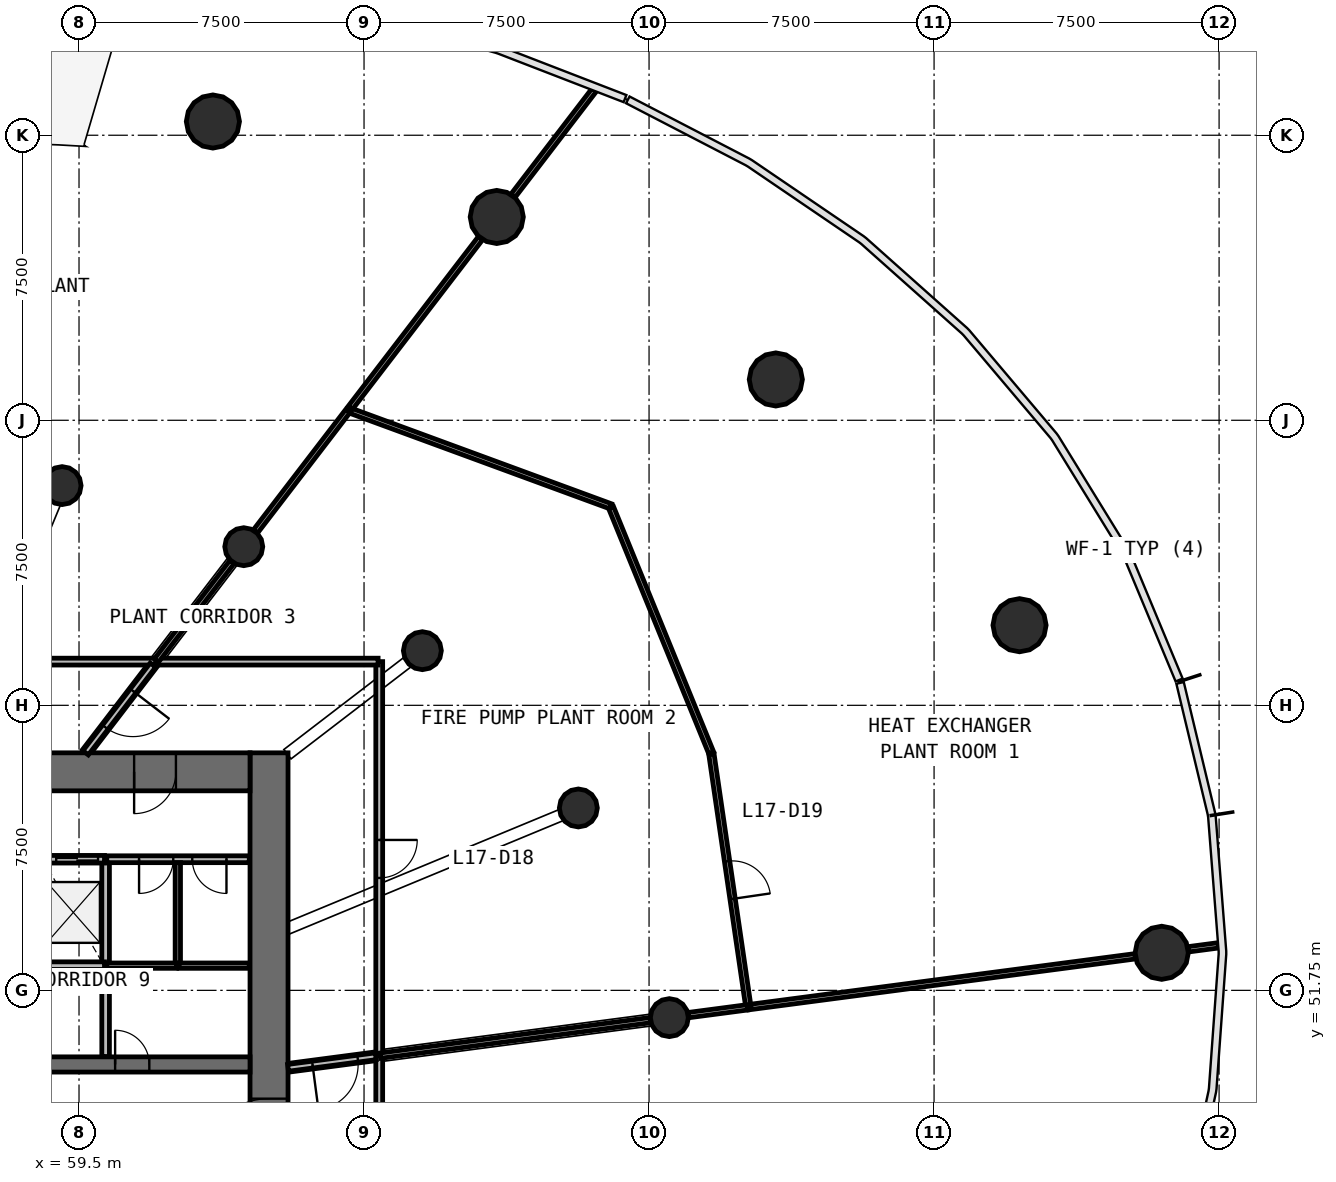
"""IFC4 building model, lengths in metres.
Left out: names, types, materials, properties, quantities, classifications, styles, units other than length and angle.
Written with IfcOpenShell. Run it as: python <this file> out.ifc"""

import sys

from ifc_helpers import new_model, si_unit, direction, frame, frame_2d, origin, origin_2d, place, context, subcontext, project, spatial, rectangle, circle, extrude, source, transform, mapped, element, fill, save


model = new_model("IFC4")
c1 = context("Model", 3, precision=1e-05, world=origin(), true_north=direction((0.0, 1.0)))
c2 = subcontext(c1, "Body", "Model", "MODEL_VIEW")
j1 = project(units=[si_unit("LENGTHUNIT", "METRE"), si_unit("PLANEANGLEUNIT", "RADIAN")], contexts=[c1])
p1 = place(None, origin())
s1 = spatial("IfcSite", under=j1, at=p1, CompositionType="ELEMENT")
p2 = place(p1, origin())
s2 = spatial("IfcBuilding", under=s1, at=p2, CompositionType="ELEMENT")
p3 = place(p2, frame((0.0, 0.0, 75.4)))
s3 = spatial("IfcBuildingStorey", under=s2, at=p3, CompositionType="ELEMENT", Elevation=75.4)
p4 = place(p3, frame((64.5, 38.0, 0.0), z_axis=(0.0, 0.0, 1.0), x_axis=(0.0, 1.0, 0.0)))
e1 = element("IfcWall", 1, at=p4, inside=s3, PredefinedType="SHEAR", context=c2, shape_type="SweptSolid", body=[
    extrude(rectangle(XDim=20.0, YDim=1.0, at=frame_2d((10.0, 0.0))), origin(), (0.0, 0.0, 1.0), 4.4),
])
p5 = place(p4, frame((9.1, 0.0, 0.0)))
e2 = element("IfcOpeningElement", 2, at=p5, cuts=e1, PredefinedType="OPENING", context=c2, shape_type="SweptSolid", body=[
    extrude(rectangle(XDim=1.8, YDim=2.1, at=frame_2d((0.9, 1.05))), frame((0.0, 0.51, 0.0), z_axis=(0.0, -1.0, 0.0), x_axis=(1.0, 0.0, 0.0)), (0.0, 0.0, 1.0), 1.02),
])
p6 = place(p3, frame((64.0, 57.5, 0.0), z_axis=(0.0, 0.0, 1.0), x_axis=(-1.0, 0.0, 0.0)))
e3 = element("IfcWall", 3, at=p6, inside=s3, PredefinedType="SHEAR", context=c2, shape_type="SweptSolid", body=[
    extrude(rectangle(XDim=24.0, YDim=1.0, at=frame_2d((12.0, 0.0))), origin(), (0.0, 0.0, 1.0), 4.4),
])
p7 = place(p6, frame((21.45, 0.0, 0.0)))
e4 = element("IfcOpeningElement", 4, at=p7, cuts=e3, PredefinedType="OPENING", context=c2, shape_type="SweptSolid", body=[
    extrude(rectangle(XDim=1.1, YDim=2.1, at=frame_2d((0.55, 1.05))), frame((0.0, 0.51, 0.0), z_axis=(0.0, -1.0, 0.0), x_axis=(1.0, 0.0, 0.0)), (0.0, 0.0, 1.0), 1.02),
])
p8 = place(p6, frame((1.95, 0.0, 0.0)))
e5 = element("IfcOpeningElement", 5, at=p8, cuts=e3, PredefinedType="OPENING", context=c2, shape_type="SweptSolid", body=[
    extrude(rectangle(XDim=1.1, YDim=2.1, at=frame_2d((0.55, 1.05))), frame((0.0, 0.51, 0.0), z_axis=(0.0, -1.0, 0.0), x_axis=(1.0, 0.0, 0.0)), (0.0, 0.0, 1.0), 1.02),
])
p9 = place(p3, frame((40.0, 49.8, 0.0), z_axis=(0.0, 0.0, 1.0), x_axis=(1.0, 0.0, 0.0)))
e6 = element("IfcWall", 6, at=p9, inside=s3, PredefinedType="SHEAR", context=c2, shape_type="SweptSolid", body=[
    extrude(rectangle(XDim=24.0, YDim=0.4, at=frame_2d((12.0, 0.0))), origin(), (0.0, 0.0, 1.0), 4.4),
])
p10 = place(p9, frame((0.9, 0.0, 0.0)))
e7 = element("IfcOpeningElement", 7, at=p10, cuts=e6, PredefinedType="OPENING", context=c2, shape_type="SweptSolid", body=[
    extrude(rectangle(XDim=1.8, YDim=2.4, at=frame_2d((0.9, 1.2))), frame((0.0, 0.21, 0.0), z_axis=(0.0, -1.0, 0.0), x_axis=(1.0, 0.0, 0.0)), (0.0, 0.0, 1.0), 0.42),
])
p11 = place(p9, frame((20.45, 0.0, 0.0)))
e8 = element("IfcOpeningElement", 8, at=p11, cuts=e6, PredefinedType="OPENING", context=c2, shape_type="SweptSolid", body=[
    extrude(rectangle(XDim=0.9, YDim=2.1, at=frame_2d((0.45, 1.05))), frame((0.0, 0.21, 0.0), z_axis=(0.0, -1.0, 0.0), x_axis=(1.0, 0.0, 0.0)), (0.0, 0.0, 1.0), 0.42),
])
p12 = place(p9, frame((11.65, 0.0, 0.0)))
e9 = element("IfcOpeningElement", 9, at=p12, cuts=e6, PredefinedType="OPENING", context=c2, shape_type="SweptSolid", body=[
    extrude(rectangle(XDim=0.9, YDim=2.1, at=frame_2d((0.45, 1.05))), frame((0.0, 0.21, 0.0), z_axis=(0.0, -1.0, 0.0), x_axis=(1.0, 0.0, 0.0)), (0.0, 0.0, 1.0), 0.42),
])
m1 = source(origin(), c2, "Body", "SweptSolid", [
    extrude(circle(Radius=0.7, at=origin_2d()), origin(), (0.0, 0.0, 1.0), 4.0),
])
for number, where, z_axis, x_axis in (
    (10, (87.99, 52.738, 0.0), (0.0, 0.0, 1.0), (1.0, 0.0, 0.0)),
    (11, (84.249, 61.358, 0.0), (0.0, 0.0, 1.0), (1.0, 0.0, 0.0)),
    (12, (77.836, 67.824, 0.0), (0.0, 0.0, 1.0), (1.0, 0.0, 0.0)),
    (13, (70.492, 72.1, 0.0), (0.0, 0.0, 1.0), (1.0, 0.0, 0.0)),
    (14, (63.023, 74.611, 0.0), (0.0, 0.0, 1.0), (1.0, 0.0, 0.0)),
):
    element("IfcColumn", number, at=place(p3, frame(where, z_axis=z_axis, x_axis=x_axis)), inside=s3, PredefinedType="COLUMN", context=c2, shape_type="MappedRepresentation", body=[
        mapped(m1, transform((0.0, 0.0, 0.0), scale=1.0)),
    ])
m2 = source(origin(), c2, "Body", "SweptSolid", [
    extrude(circle(Radius=0.5, at=origin_2d()), origin(), (0.0, 0.0, 1.0), 4.4),
])
for number, where, z_axis, x_axis in (
    (15, (75.034, 51.032, 0.0), (0.0, 0.0, 1.0), (1.0, 0.0, 0.0)),
    (16, (72.639, 56.549, 0.0), (0.0, 0.0, 1.0), (1.0, 0.0, 0.0)),
    (17, (68.535, 60.688, 0.0), (0.0, 0.0, 1.0), (1.0, 0.0, 0.0)),
    (18, (63.835, 63.424, 0.0), (0.0, 0.0, 1.0), (1.0, 0.0, 0.0)),
    (19, (59.055, 65.031, 0.0), (0.0, 0.0, 1.0), (1.0, 0.0, 0.0)),
):
    element("IfcColumn", number, at=place(p3, frame(where, z_axis=z_axis, x_axis=x_axis)), inside=s3, PredefinedType="COLUMN", context=c2, shape_type="MappedRepresentation", body=[
        mapped(m2, transform((0.0, 0.0, 0.0), scale=1.0)),
    ])
p13 = place(p3, frame((60.2, 52.4, 0.0), z_axis=(0.0, 0.0, 1.0), x_axis=(0.0, 1.0, 0.0)))
e20 = element("IfcWall", 20, at=p13, inside=s3, PredefinedType="SOLIDWALL", context=c2, shape_type="SweptSolid", body=[
    extrude(rectangle(XDim=2.8, YDim=0.2, at=frame_2d((1.4, 0.0))), origin(), (0.0, 0.0, 1.0), 4.0),
])
p14 = place(p3, frame((60.2, 50.01, 0.0), z_axis=(0.0, 0.0, 1.0), x_axis=(0.0, 1.0, 0.0)))
e21 = element("IfcWall", 21, at=p14, inside=s3, PredefinedType="SOLIDWALL", context=c2, shape_type="SweptSolid", body=[
    extrude(rectangle(XDim=2.36, YDim=0.2, at=frame_2d((1.18, 0.0))), origin(), (0.0, 0.0, 1.0), 4.0),
])
p15 = place(p3, frame((60.17, 52.4, 0.0), z_axis=(0.0, 0.0, 1.0), x_axis=(-1.0, 0.0, 0.0)))
e22 = element("IfcWall", 22, at=p15, inside=s3, PredefinedType="SOLIDWALL", context=c2, shape_type="SweptSolid", body=[
    extrude(rectangle(XDim=1.64, YDim=0.2, at=frame_2d((0.82, 0.0))), origin(), (0.0, 0.0, 1.0), 4.0),
])
p16 = place(p3, frame((60.17, 55.2, 0.0), z_axis=(0.0, 0.0, 1.0), x_axis=(-1.0, 0.0, 0.0)))
e23 = element("IfcWall", 23, at=p16, inside=s3, PredefinedType="SOLIDWALL", context=c2, shape_type="SweptSolid", body=[
    extrude(rectangle(XDim=1.64, YDim=0.2, at=frame_2d((0.82, 0.0))), origin(), (0.0, 0.0, 1.0), 4.0),
])
p17 = place(p16, frame((0.17, 0.0, 0.0)))
e24 = element("IfcOpeningElement", 24, at=p17, cuts=e23, PredefinedType="OPENING", context=c2, shape_type="SweptSolid", body=[
    extrude(rectangle(XDim=1.1, YDim=2.1, at=frame_2d((0.55, 1.05))), frame((0.0, 0.11, 0.0), z_axis=(0.0, -1.0, 0.0), x_axis=(1.0, 0.0, 0.0)), (0.0, 0.0, 1.0), 0.22),
])
p18 = place(p3, frame((67.4, 50.027, 0.0), z_axis=(0.0, 0.0, 1.0), x_axis=(0.0, -1.0, 0.0)))
e25 = element("IfcWall", 25, at=p18, inside=s3, PredefinedType="PARTITIONING", context=c2, shape_type="SweptSolid", body=[
    extrude(rectangle(XDim=13.24, YDim=0.18, at=frame_2d((6.62, 0.0))), origin(), (0.0, 0.0, 1.0), 2.8),
])
p19 = place(p18, frame((6.19, 0.0, 0.0)))
e26 = element("IfcOpeningElement", 26, at=p19, cuts=e25, PredefinedType="OPENING", context=c2, shape_type="SweptSolid", body=[
    extrude(rectangle(XDim=1.0, YDim=2.1, at=frame_2d((0.5, 1.05))), frame((0.0, 0.1, 0.0), z_axis=(0.0, -1.0, 0.0), x_axis=(1.0, 0.0, 0.0)), (0.0, 0.0, 1.0), 0.2),
])
p20 = place(p3, frame((50.397, 60.4, 0.0), z_axis=(0.0, 0.0, 1.0), x_axis=(1.0, 0.0, 0.0)))
e27 = element("IfcWall", 27, at=p20, inside=s3, PredefinedType="PARTITIONING", context=c2, shape_type="SweptSolid", body=[
    extrude(rectangle(XDim=11.117, YDim=0.18, at=frame_2d((5.559, 0.0))), origin(), (0.0, 0.0, 1.0), 2.8),
])
p21 = place(p20, frame((5.067, 0.0, 0.0)))
e28 = element("IfcOpeningElement", 28, at=p21, cuts=e27, PredefinedType="OPENING", context=c2, shape_type="SweptSolid", body=[
    extrude(rectangle(XDim=1.0, YDim=2.1, at=frame_2d((0.5, 1.05))), frame((0.0, 0.1, 0.0), z_axis=(0.0, -1.0, 0.0), x_axis=(1.0, 0.0, 0.0)), (0.0, 0.0, 1.0), 0.2),
])
p22 = place(p3, frame((67.4, 60.4, 0.0), z_axis=(0.0, 0.0, 1.0), x_axis=(0.0, -1.0, 0.0)))
e29 = element("IfcWall", 29, at=p22, inside=s3, PredefinedType="PARTITIONING", context=c2, shape_type="SweptSolid", body=[
    extrude(rectangle(XDim=10.343, YDim=0.18, at=frame_2d((5.171, 0.0))), origin(), (0.0, 0.0, 1.0), 2.8),
])
p23 = place(p22, frame((4.693, 0.0, 0.0)))
e30 = element("IfcOpeningElement", 30, at=p23, cuts=e29, PredefinedType="OPENING", context=c2, shape_type="SweptSolid", body=[
    extrude(rectangle(XDim=1.0, YDim=2.1, at=frame_2d((0.5, 1.05))), frame((0.0, 0.1, 0.0), z_axis=(0.0, -1.0, 0.0), x_axis=(1.0, 0.0, 0.0)), (0.0, 0.0, 1.0), 0.2),
])
p24 = place(p3, frame((67.37, 60.4, 0.0), z_axis=(0.0, 0.0, 1.0), x_axis=(-1.0, 0.0, 0.0)))
e31 = element("IfcWall", 31, at=p24, inside=s3, PredefinedType="PARTITIONING", context=c2, shape_type="SweptSolid", body=[
    extrude(rectangle(XDim=5.825, YDim=0.18, at=frame_2d((2.913, 0.0))), origin(), (0.0, 0.0, 1.0), 2.8),
])
p25 = place(p3, frame((63.98, 55.2, 0.0), z_axis=(0.0, 0.0, 1.0), x_axis=(-1.0, 0.0, 0.0)))
e32 = element("IfcWall", 32, at=p25, inside=s3, PredefinedType="PARTITIONING", context=c2, shape_type="SweptSolid", body=[
    extrude(rectangle(XDim=3.75, YDim=0.18, at=frame_2d((1.875, 0.0))), origin(), (0.0, 0.0, 1.0), 4.0),
])
p26 = place(p25, frame((2.0, 0.0, 0.0)))
e33 = element("IfcOpeningElement", 33, at=p26, cuts=e32, PredefinedType="OPENING", context=c2, shape_type="SweptSolid", body=[
    extrude(rectangle(XDim=0.9, YDim=2.1, at=frame_2d((0.45, 1.05))), frame((0.0, 0.1, 0.0), z_axis=(0.0, -1.0, 0.0), x_axis=(1.0, 0.0, 0.0)), (0.0, 0.0, 1.0), 0.2),
])
p27 = place(p25, frame((0.6, 0.0, 0.0)))
e34 = element("IfcOpeningElement", 34, at=p27, cuts=e32, PredefinedType="OPENING", context=c2, shape_type="SweptSolid", body=[
    extrude(rectangle(XDim=0.9, YDim=2.1, at=frame_2d((0.45, 1.05))), frame((0.0, 0.1, 0.0), z_axis=(0.0, -1.0, 0.0), x_axis=(1.0, 0.0, 0.0)), (0.0, 0.0, 1.0), 0.2),
])
p28 = place(p3, frame((61.446, 60.31, 0.0), z_axis=(0.0, 0.0, 1.0), x_axis=(-0.608737787706, -0.793371480341, 0.0)))
e35 = element("IfcWall", 35, at=p28, inside=s3, PredefinedType="PARTITIONING", context=c2, shape_type="SweptSolid", body=[
    extrude(rectangle(XDim=2.912, YDim=0.18, at=frame_2d((1.456, 0.0))), origin(), (0.0, 0.0, 1.0), 2.8),
])
p29 = place(p28, frame((0.862, 0.0, 0.0)))
e36 = element("IfcOpeningElement", 36, at=p29, cuts=e35, PredefinedType="OPENING", context=c2, shape_type="SweptSolid", body=[
    extrude(rectangle(XDim=1.2, YDim=2.1, at=frame_2d((0.6, 1.05))), frame((0.0, 0.1, 0.0), z_axis=(0.0, -1.0, 0.0), x_axis=(1.0, 0.0, 0.0)), (0.0, 0.0, 1.0), 0.2),
])
p30 = place(p3, frame((67.31, 50.016, 0.0), z_axis=(0.0, 0.0, 1.0), x_axis=(-0.991440737811, -0.130557509967, 0.0)))
e37 = element("IfcWall", 37, at=p30, inside=s3, PredefinedType="PARTITIONING", context=c2, shape_type="SweptSolid", body=[
    extrude(rectangle(XDim=2.33, YDim=0.18, at=frame_2d((1.165, 0.0))), origin(), (0.0, 0.0, 1.0), 2.8),
])
p31 = place(p30, frame((0.48, 0.0, 0.0)))
e38 = element("IfcOpeningElement", 38, at=p31, cuts=e37, PredefinedType="OPENING", context=c2, shape_type="SweptSolid", body=[
    extrude(rectangle(XDim=1.2, YDim=2.1, at=frame_2d((0.6, 1.05))), frame((0.0, 0.1, 0.0), z_axis=(0.0, -1.0, 0.0), x_axis=(1.0, 0.0, 0.0)), (0.0, 0.0, 1.0), 0.2),
])
p32 = place(p3, frame((77.115, 51.306, 0.0), z_axis=(0.0, 0.0, 1.0), x_axis=(0.991445064554, 0.130524648905, 0.0)))
e39 = element("IfcWall", 39, at=p32, inside=s3, PredefinedType="PARTITIONING", context=c2, shape_type="SweptSolid", body=[
    extrude(rectangle(XDim=10.265, YDim=0.14, at=frame_2d((5.133, 0.0))), origin(), (0.0, 0.0, 1.0), 2.8),
])
p33 = place(p3, frame((73.487, 64.487, 0.0), z_axis=(0.0, 0.0, 1.0), x_axis=(-0.938632857677, 0.344917901085, 0.0)))
e40 = element("IfcWall", 40, at=p33, inside=s3, PredefinedType="PARTITIONING", context=c2, shape_type="SweptSolid", body=[
    extrude(rectangle(XDim=7.343, YDim=0.14, at=frame_2d((3.671, 0.0))), origin(), (0.0, 0.0, 1.0), 2.8),
])
p34 = place(p3, frame((67.43, 50.031, 0.0), z_axis=(0.0, 0.0, 1.0), x_axis=(0.991448495935, 0.130498582014, 0.0)))
e41 = element("IfcWall", 41, at=p34, inside=s3, PredefinedType="PARTITIONING", context=c2, shape_type="SweptSolid", body=[
    extrude(rectangle(XDim=7.165, YDim=0.14, at=frame_2d((3.583, 0.0))), origin(), (0.0, 0.0, 1.0), 2.8),
])
p35 = place(p3, frame((76.136, 57.998, 0.0), z_axis=(0.0, 0.0, 1.0), x_axis=(-0.377966751533, 0.925819169566, 0.0)))
e42 = element("IfcWall", 42, at=p35, inside=s3, PredefinedType="PARTITIONING", context=c2, shape_type="SweptSolid", body=[
    extrude(rectangle(XDim=6.98, YDim=0.14, at=frame_2d((3.49, 0.0))), origin(), (0.0, 0.0, 1.0), 2.8),
])
p36 = place(p3, frame((76.141, 57.968, 0.0), z_axis=(0.0, 0.0, 1.0), x_axis=(0.144720027083, -0.989472644271, 0.0)))
e43 = element("IfcWall", 43, at=p36, inside=s3, PredefinedType="PARTITIONING", context=c2, shape_type="SweptSolid", body=[
    extrude(rectangle(XDim=6.702, YDim=0.14, at=frame_2d((3.351, 0.0))), origin(), (0.0, 0.0, 1.0), 2.8),
])
p37 = place(p36, frame((2.852, 0.0, 0.0)))
e44 = element("IfcOpeningElement", 44, at=p37, cuts=e43, PredefinedType="OPENING", context=c2, shape_type="SweptSolid", body=[
    extrude(rectangle(XDim=1.0, YDim=2.1, at=frame_2d((0.5, 1.05))), frame((0.0, 0.08, 0.0), z_axis=(0.0, -1.0, 0.0), x_axis=(1.0, 0.0, 0.0)), (0.0, 0.0, 1.0), 0.16),
])
p38 = place(p3, frame((66.639, 67.078, 0.0), z_axis=(0.0, 0.0, 1.0), x_axis=(0.608768603858, 0.793347834784, 0.0)))
e45 = element("IfcWall", 45, at=p38, inside=s3, PredefinedType="PARTITIONING", context=c2, shape_type="SweptSolid", body=[
    extrude(rectangle(XDim=5.625, YDim=0.14, at=frame_2d((2.813, 0.0))), origin(), (0.0, 0.0, 1.0), 2.8),
])
p39 = place(p3, frame((64.142, 63.824, 0.0), z_axis=(0.0, 0.0, 1.0), x_axis=(0.608766057901, 0.793349788396, 0.0)))
e46 = element("IfcWall", 46, at=p39, inside=s3, PredefinedType="PARTITIONING", context=c2, shape_type="SweptSolid", body=[
    extrude(rectangle(XDim=3.998, YDim=0.14, at=frame_2d((1.999, 0.0))), origin(), (0.0, 0.0, 1.0), 2.8),
])
p40 = place(p3, frame((70.921, 72.658, 0.0), z_axis=(0.0, 0.0, 1.0), x_axis=(0.608803527611, 0.793321035123, 0.0)))
e47 = element("IfcWall", 47, at=p40, inside=s3, PredefinedType="PARTITIONING", context=c2, shape_type="SweptSolid", body=[
    extrude(rectangle(XDim=3.513, YDim=0.14, at=frame_2d((1.756, 0.0))), origin(), (0.0, 0.0, 1.0), 3.1),
])
p41 = place(p3, frame((61.537, 60.429, 0.0), z_axis=(0.0, 0.0, 1.0), x_axis=(0.608754323654, 0.793358792371, 0.0)))
e48 = element("IfcWall", 48, at=p41, inside=s3, PredefinedType="PARTITIONING", context=c2, shape_type="SweptSolid", body=[
    extrude(rectangle(XDim=3.271, YDim=0.14, at=frame_2d((1.635, 0.0))), origin(), (0.0, 0.0, 1.0), 2.8),
])
p42 = place(p3, frame((62.1, 52.4, 0.0), z_axis=(0.0, 0.0, 1.0), x_axis=(0.0, 1.0, 0.0)))
e49 = element("IfcWall", 49, at=p42, inside=s3, PredefinedType="PARTITIONING", context=c2, shape_type="SweptSolid", body=[
    extrude(rectangle(XDim=2.71, YDim=0.14, at=frame_2d((1.355, 0.0))), origin(), (0.0, 0.0, 1.0), 3.1),
])
p43 = place(p3, frame((62.07, 52.4, 0.0), z_axis=(0.0, 0.0, 1.0), x_axis=(-1.0, 0.0, 0.0)))
e50 = element("IfcWall", 50, at=p43, inside=s3, PredefinedType="PARTITIONING", context=c2, shape_type="SweptSolid", body=[
    extrude(rectangle(XDim=1.84, YDim=0.14, at=frame_2d((0.92, 0.0))), origin(), (0.0, 0.0, 1.0), 3.1),
])
p44 = place(p3, frame((63.98, 52.4, 0.0), z_axis=(0.0, 0.0, 1.0), x_axis=(-1.0, 0.0, 0.0)))
e51 = element("IfcWall", 51, at=p44, inside=s3, PredefinedType="PARTITIONING", context=c2, shape_type="SweptSolid", body=[
    extrude(rectangle(XDim=1.85, YDim=0.14, at=frame_2d((0.925, 0.0))), origin(), (0.0, 0.0, 1.0), 3.1),
])
p45 = place(p3, frame((75.534, 51.098, 0.0), z_axis=(0.0, 0.0, 1.0), x_axis=(0.991455357704, 0.130446439887, 0.0)))
e52 = element("IfcWall", 52, at=p45, inside=s3, PredefinedType="PARTITIONING", context=c2, shape_type="SweptSolid", body=[
    extrude(rectangle(XDim=1.565, YDim=0.14, at=frame_2d((0.782, 0.0))), origin(), (0.0, 0.0, 1.0), 2.8),
])
p46 = place(p3, frame((88.689, 52.83, 0.0), z_axis=(0.0, 0.0, 1.0), x_axis=(0.991421968508, 0.130699963122, 0.0)))
e53 = element("IfcWall", 53, at=p46, inside=s3, PredefinedType="PARTITIONING", context=c2, shape_type="SweptSolid", body=[
    extrude(rectangle(XDim=0.798, YDim=0.14, at=frame_2d((0.399, 0.0))), origin(), (0.0, 0.0, 1.0), 3.1),
])
m3 = source(origin(), c2, "Body", "SweptSolid", [
    extrude(rectangle(XDim=1.8, YDim=2.1, at=frame_2d((0.9, 1.05))), frame((0.0, 0.025, 0.0), z_axis=(0.0, -1.0, 0.0), x_axis=(1.0, 0.0, 0.0)), (0.0, 0.0, 1.0), 0.05),
])
p47 = place(p5, origin())
e54 = element("IfcDoor", 54, at=p47, inside=s3, OperationType="SINGLE_SWING_LEFT", PredefinedType="DOOR", context=c2, shape_type="MappedRepresentation", body=[
    mapped(m3, transform((0.0, 0.0, 0.0), scale=1.0)),
])
fill(e2, e54)
m4 = source(origin(), c2, "Body", "SweptSolid", [
    extrude(rectangle(XDim=1.1, YDim=2.1, at=frame_2d((0.55, 1.05))), frame((0.0, 0.025, 0.0), z_axis=(0.0, -1.0, 0.0), x_axis=(1.0, 0.0, 0.0)), (0.0, 0.0, 1.0), 0.05),
])
p48 = place(p17, origin())
e55 = element("IfcDoor", 55, at=p48, inside=s3, OperationType="DOUBLE_DOOR_SLIDING", PredefinedType="USERDEFINED", context=c2, shape_type="MappedRepresentation", body=[
    mapped(m4, transform((0.0, 0.0, 0.0), scale=1.0)),
])
fill(e24, e55)
m5 = source(origin(), c2, "Body", "SweptSolid", [
    extrude(rectangle(XDim=1.1, YDim=2.1, at=frame_2d((0.55, 1.05))), frame((0.0, 0.025, 0.0), z_axis=(0.0, -1.0, 0.0), x_axis=(1.0, 0.0, 0.0)), (0.0, 0.0, 1.0), 0.05),
])
p49 = place(p8, origin())
e56 = element("IfcDoor", 56, at=p49, inside=s3, OperationType="SINGLE_SWING_RIGHT", PredefinedType="DOOR", context=c2, shape_type="MappedRepresentation", body=[
    mapped(m5, transform((0.0, 0.0, 0.0), scale=1.0)),
])
fill(e5, e56)
m6 = source(origin(), c2, "Body", "SweptSolid", [
    extrude(rectangle(XDim=1.0, YDim=2.1, at=frame_2d((0.5, 1.05))), frame((0.0, 0.025, 0.0), z_axis=(0.0, -1.0, 0.0), x_axis=(1.0, 0.0, 0.0)), (0.0, 0.0, 1.0), 0.05),
])
p50 = place(p23, origin())
e57 = element("IfcDoor", 57, at=p50, inside=s3, OperationType="SINGLE_SWING_LEFT", PredefinedType="DOOR", context=c2, shape_type="MappedRepresentation", body=[
    mapped(m6, transform((0.0, 0.0, 0.0), scale=1.0)),
])
fill(e30, e57)
p51 = place(p37, origin())
e58 = element("IfcDoor", 58, at=p51, inside=s3, OperationType="SINGLE_SWING_RIGHT", PredefinedType="DOOR", context=c2, shape_type="MappedRepresentation", body=[
    mapped(m6, transform((0.0, 0.0, 0.0), scale=1.0)),
])
fill(e44, e58)
m7 = source(origin(), c2, "Body", "SweptSolid", [
    extrude(rectangle(XDim=1.2, YDim=2.1, at=frame_2d((0.6, 1.05))), frame((0.0, 0.025, 0.0), z_axis=(0.0, -1.0, 0.0), x_axis=(1.0, 0.0, 0.0)), (0.0, 0.0, 1.0), 0.05),
])
p52 = place(p29, origin())
e59 = element("IfcDoor", 59, at=p52, inside=s3, OperationType="SINGLE_SWING_LEFT", PredefinedType="DOOR", context=c2, shape_type="MappedRepresentation", body=[
    mapped(m7, transform((0.0, 0.0, 0.0), scale=1.0)),
])
fill(e36, e59)
p53 = place(p31, origin())
e60 = element("IfcDoor", 60, at=p53, inside=s3, OperationType="SINGLE_SWING_RIGHT", PredefinedType="DOOR", context=c2, shape_type="MappedRepresentation", body=[
    mapped(m7, transform((0.0, 0.0, 0.0), scale=1.0)),
])
fill(e38, e60)
m8 = source(origin(), c2, "Body", "SweptSolid", [
    extrude(rectangle(XDim=0.9, YDim=2.1, at=frame_2d((0.45, 1.05))), frame((0.0, 0.025, 0.0), z_axis=(0.0, -1.0, 0.0), x_axis=(1.0, 0.0, 0.0)), (0.0, 0.0, 1.0), 0.05),
])
p54 = place(p11, origin())
e61 = element("IfcDoor", 61, at=p54, inside=s3, OperationType="SINGLE_SWING_LEFT", PredefinedType="DOOR", context=c2, shape_type="MappedRepresentation", body=[
    mapped(m8, transform((0.0, 0.0, 0.0), scale=1.0)),
])
fill(e8, e61)
p55 = place(p26, origin())
e62 = element("IfcDoor", 62, at=p55, inside=s3, OperationType="SINGLE_SWING_RIGHT", PredefinedType="DOOR", context=c2, shape_type="MappedRepresentation", body=[
    mapped(m8, transform((0.0, 0.0, 0.0), scale=1.0)),
])
fill(e33, e62)
p56 = place(p27, origin())
e63 = element("IfcDoor", 63, at=p56, inside=s3, OperationType="SINGLE_SWING_LEFT", PredefinedType="DOOR", context=c2, shape_type="MappedRepresentation", body=[
    mapped(m8, transform((0.0, 0.0, 0.0), scale=1.0)),
])
fill(e34, e63)
save(model, sys.argv[1])
